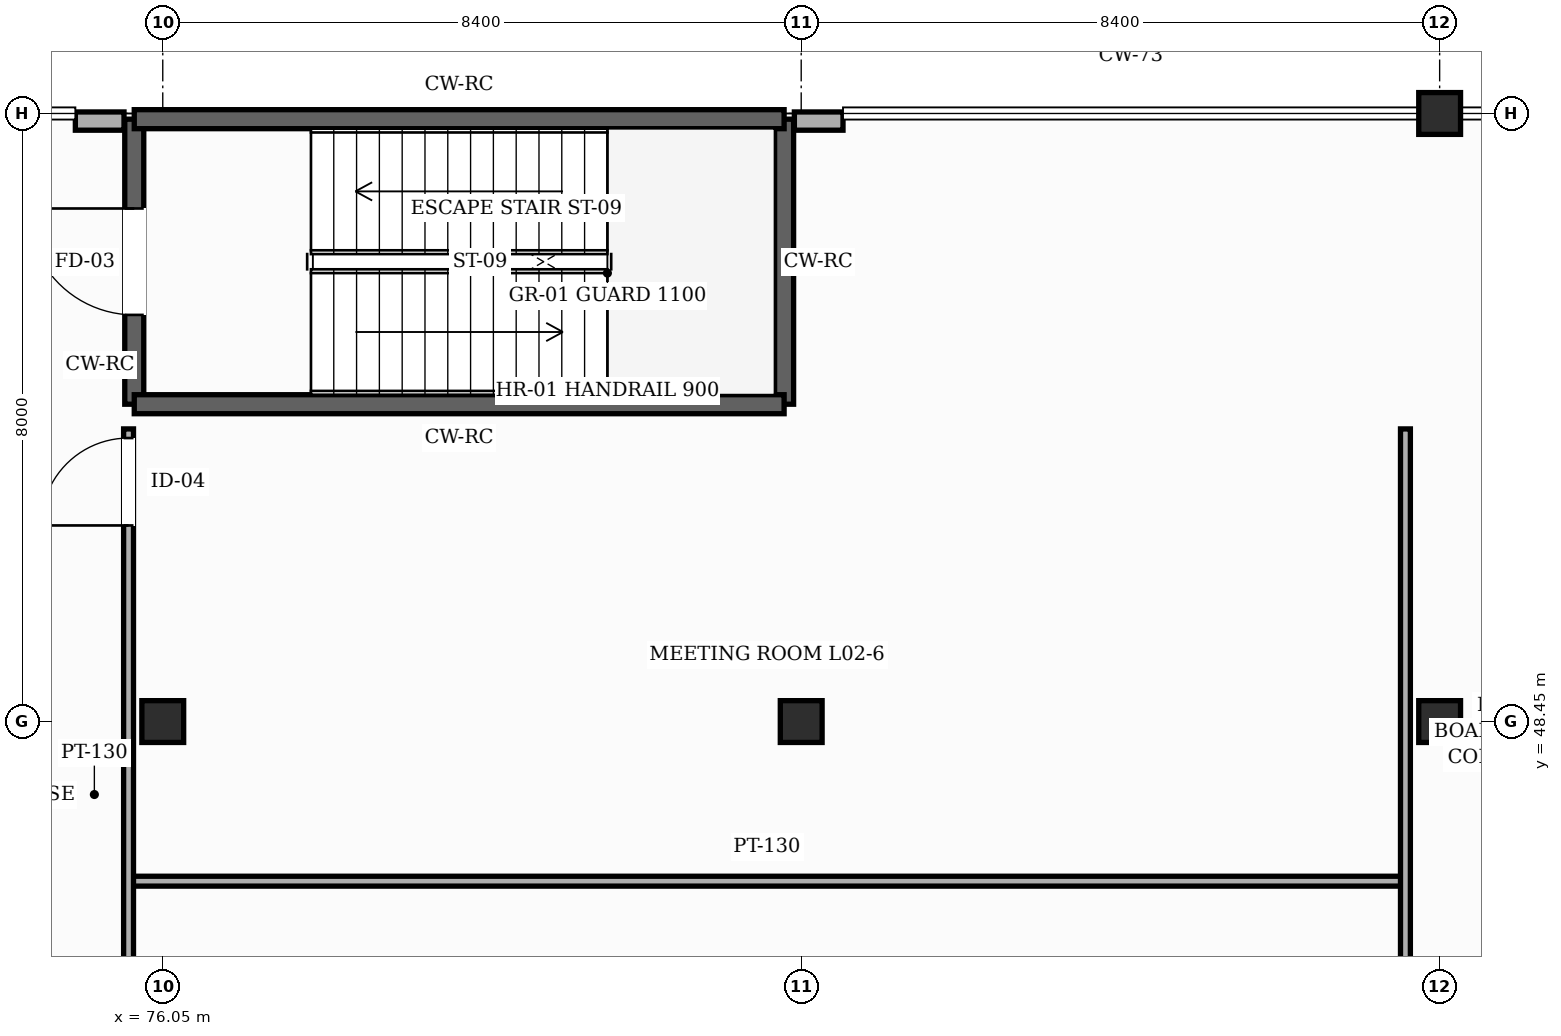
"""IFC4 building model, lengths in metres.
Left out: names, types, materials, properties, quantities, classifications, styles, units other than length and angle.
Written with IfcOpenShell. Run it as: python <this file> out.ifc"""

import sys

from ifc_helpers import new_model, si_unit, direction, frame, frame_2d, origin, origin_2d, place, context, subcontext, project, spatial, rectangle, hollow_rectangle, extrude, element, fill, save


model = new_model("IFC4")
c1 = context("Model", 3, precision=1e-05, world=origin(), true_north=direction((0.0, 1.0)))
c2 = subcontext(c1, "Body", "Model", "MODEL_VIEW")
j1 = project(units=[si_unit("LENGTHUNIT", "METRE"), si_unit("PLANEANGLEUNIT", "RADIAN")], contexts=[c1])
p1 = place(None, origin())
s1 = spatial("IfcSite", under=j1, at=p1, CompositionType="ELEMENT")
p2 = place(p1, origin())
s2 = spatial("IfcBuilding", under=s1, at=p2, CompositionType="ELEMENT")
p3 = place(p2, frame((0.0, 0.0, 10.2)))
s3 = spatial("IfcBuildingStorey", under=s2, at=p3, CompositionType="ELEMENT", Elevation=10.2)
for number, where, z_axis, x_axis in (
    (1, (76.05, 48.45, 0.0), (0.0, 0.0, 1.0), (1.0, 0.0, 0.0)),
    (2, (84.45, 48.45, 0.0), (0.0, 0.0, 1.0), (1.0, 0.0, 0.0)),
    (3, (92.85, 48.45, 0.0), (0.0, 0.0, 1.0), (1.0, 0.0, 0.0)),
    (4, (92.85, 56.45, 0.0), (0.0, 0.0, 1.0), (1.0, 0.0, 0.0)),
):
    element("IfcColumn", number, at=place(p3, frame(where, z_axis=z_axis, x_axis=x_axis)), inside=s3, PredefinedType="COLUMN", context=c2, shape_type="SweptSolid", body=[
        extrude(hollow_rectangle(XDim=0.55, YDim=0.55, WallThickness=0.022, InnerFilletRadius=0.022, OuterFilletRadius=0.044, at=origin_2d()), origin(), (0.0, 0.0, 1.0), 4.8),
    ])
p4 = place(p3, frame((74.9, 56.35, 0.0), z_axis=(0.0, 0.0, 1.0), x_axis=(1.0, 0.0, 0.0)))
e5 = element("IfcWall", 5, at=p4, inside=s3, PredefinedType="SOLIDWALL", context=c2, shape_type="SweptSolid", body=[
    extrude(rectangle(XDim=0.64, YDim=0.24, at=frame_2d((0.32, 0.0))), origin(), (0.0, 0.0, 1.0), 3.135),
])
p5 = place(p3, frame((84.36, 56.35, 0.0), z_axis=(0.0, 0.0, 1.0), x_axis=(1.0, 0.0, 0.0)))
e6 = element("IfcWall", 6, at=p5, inside=s3, PredefinedType="SOLIDWALL", context=c2, shape_type="SweptSolid", body=[
    extrude(rectangle(XDim=0.64, YDim=0.24, at=frame_2d((0.32, 0.0))), origin(), (0.0, 0.0, 1.0), 3.135),
])
p6 = place(p3, frame((75.675, 52.625, 0.0), z_axis=(0.0, 0.0, 1.0), x_axis=(0.0, 1.0, 0.0)))
e7 = element("IfcWall", 7, at=p6, inside=s3, PredefinedType="SHEAR", context=c2, shape_type="SweptSolid", body=[
    extrude(rectangle(XDim=3.75, YDim=0.25, at=frame_2d((1.875, 0.0))), origin(), (0.0, 0.0, 1.0), 4.56),
])
p7 = place(p6, frame((1.175, 0.0, 0.0)))
e8 = element("IfcOpeningElement", 8, at=p7, cuts=e7, PredefinedType="OPENING", context=c2, shape_type="SweptSolid", body=[
    extrude(rectangle(XDim=1.4, YDim=2.25, at=frame_2d((0.7, 1.125))), frame((0.0, 0.135, 0.0), z_axis=(0.0, -1.0, 0.0), x_axis=(1.0, 0.0, 0.0)), (0.0, 0.0, 1.0), 0.27),
])
p8 = place(p3, frame((84.225, 56.375, 0.0), z_axis=(0.0, 0.0, 1.0), x_axis=(0.0, -1.0, 0.0)))
e9 = element("IfcWall", 9, at=p8, inside=s3, PredefinedType="SHEAR", context=c2, shape_type="SweptSolid", body=[
    extrude(rectangle(XDim=3.75, YDim=0.25, at=frame_2d((1.875, 0.0))), origin(), (0.0, 0.0, 1.0), 4.56),
])
for number, where, z_axis, x_axis in (
    (10, (84.225, 52.625, 0.0), (0.0, 0.0, 1.0), (-1.0, 0.0, 0.0)),
    (11, (75.675, 56.375, 0.0), (0.0, 0.0, 1.0), (1.0, 0.0, 0.0)),
):
    element("IfcWall", number, at=place(p3, frame(where, z_axis=z_axis, x_axis=x_axis)), inside=s3, PredefinedType="SHEAR", context=c2, shape_type="SweptSolid", body=[
        extrude(rectangle(XDim=8.55, YDim=0.25, at=frame_2d((4.275, 0.0))), origin(), (0.0, 0.0, 1.0), 4.56),
    ])
p9 = place(p3, frame((75.6, 46.35, 0.0), z_axis=(0.0, 0.0, 1.0), x_axis=(1.0, 0.0, 0.0)))
e12 = element("IfcWall", 12, at=p9, inside=s3, PredefinedType="PARTITIONING", context=c2, shape_type="SweptSolid", body=[
    extrude(rectangle(XDim=16.8, YDim=0.13, at=frame_2d((8.4, 0.0))), origin(), (0.0, 0.0, 1.0), 4.545),
])
p10 = place(p3, frame((75.6, 16.6, 0.0), z_axis=(0.0, 0.0, 1.0), x_axis=(0.0, 1.0, 0.0)))
e13 = element("IfcWall", 13, at=p10, inside=s3, PredefinedType="PARTITIONING", context=c2, shape_type="SweptSolid", body=[
    extrude(rectangle(XDim=35.7, YDim=0.13, at=frame_2d((17.85, 0.0))), origin(), (0.0, 0.0, 1.0), 4.545),
])
p11 = place(p10, frame((2.4, 0.0, 0.0)))
e14 = element("IfcOpeningElement", 14, at=p11, cuts=e13, PredefinedType="OPENING", context=c2, shape_type="SweptSolid", body=[
    extrude(rectangle(XDim=1.15, YDim=2.22, at=frame_2d((0.575, 1.11))), frame((0.0, 0.075, 0.0), z_axis=(0.0, -1.0, 0.0), x_axis=(1.0, 0.0, 0.0)), (0.0, 0.0, 1.0), 0.15),
])
p12 = place(p10, frame((8.35, 0.0, 0.0)))
e15 = element("IfcOpeningElement", 15, at=p12, cuts=e13, PredefinedType="OPENING", context=c2, shape_type="SweptSolid", body=[
    extrude(rectangle(XDim=1.15, YDim=2.22, at=frame_2d((0.575, 1.11))), frame((0.0, 0.075, 0.0), z_axis=(0.0, -1.0, 0.0), x_axis=(1.0, 0.0, 0.0)), (0.0, 0.0, 1.0), 0.15),
])
p13 = place(p10, frame((12.02, 0.0, 0.0)))
e16 = element("IfcOpeningElement", 16, at=p13, cuts=e13, PredefinedType="OPENING", context=c2, shape_type="SweptSolid", body=[
    extrude(rectangle(XDim=1.15, YDim=2.22, at=frame_2d((0.575, 1.11))), frame((0.0, 0.075, 0.0), z_axis=(0.0, -1.0, 0.0), x_axis=(1.0, 0.0, 0.0)), (0.0, 0.0, 1.0), 0.15),
])
p14 = place(p10, frame((20.25, 0.0, 0.0)))
e17 = element("IfcOpeningElement", 17, at=p14, cuts=e13, PredefinedType="OPENING", context=c2, shape_type="SweptSolid", body=[
    extrude(rectangle(XDim=1.15, YDim=2.22, at=frame_2d((0.575, 1.11))), frame((0.0, 0.075, 0.0), z_axis=(0.0, -1.0, 0.0), x_axis=(1.0, 0.0, 0.0)), (0.0, 0.0, 1.0), 0.15),
])
p15 = place(p10, frame((26.2, 0.0, 0.0)))
e18 = element("IfcOpeningElement", 18, at=p15, cuts=e13, PredefinedType="OPENING", context=c2, shape_type="SweptSolid", body=[
    extrude(rectangle(XDim=1.15, YDim=2.22, at=frame_2d((0.575, 1.11))), frame((0.0, 0.075, 0.0), z_axis=(0.0, -1.0, 0.0), x_axis=(1.0, 0.0, 0.0)), (0.0, 0.0, 1.0), 0.15),
])
p16 = place(p10, frame((34.43, 0.0, 0.0)))
e19 = element("IfcOpeningElement", 19, at=p16, cuts=e13, PredefinedType="OPENING", context=c2, shape_type="SweptSolid", body=[
    extrude(rectangle(XDim=1.15, YDim=2.22, at=frame_2d((0.575, 1.11))), frame((0.0, 0.075, 0.0), z_axis=(0.0, -1.0, 0.0), x_axis=(1.0, 0.0, 0.0)), (0.0, 0.0, 1.0), 0.15),
])
p17 = place(p3, frame((92.4, 16.6, 0.0), z_axis=(0.0, 0.0, 1.0), x_axis=(0.0, 1.0, 0.0)))
e20 = element("IfcWall", 20, at=p17, inside=s3, PredefinedType="PARTITIONING", context=c2, shape_type="SweptSolid", body=[
    extrude(rectangle(XDim=35.7, YDim=0.13, at=frame_2d((17.85, 0.0))), origin(), (0.0, 0.0, 1.0), 4.545),
])
p18 = place(p7, origin())
e21 = element("IfcDoor", 21, at=p18, inside=s3, OperationType="SINGLE_SWING_RIGHT", PredefinedType="DOOR", context=c2, shape_type="SweptSolid", body=[
    extrude(rectangle(XDim=1.4, YDim=2.25, at=frame_2d((0.7, 1.125))), frame((0.0, 0.025, 0.0), z_axis=(0.0, -1.0, 0.0), x_axis=(1.0, 0.0, 0.0)), (0.0, 0.0, 1.0), 0.05),
])
fill(e8, e21)
p19 = place(p16, origin())
e22 = element("IfcDoor", 22, at=p19, inside=s3, OperationType="SINGLE_SWING_LEFT", PredefinedType="DOOR", context=c2, shape_type="SweptSolid", body=[
    extrude(rectangle(XDim=1.15, YDim=2.22, at=frame_2d((0.575, 1.11))), frame((0.0, 0.025, 0.0), z_axis=(0.0, -1.0, 0.0), x_axis=(1.0, 0.0, 0.0)), (0.0, 0.0, 1.0), 0.05),
])
fill(e19, e22)
save(model, sys.argv[1])
